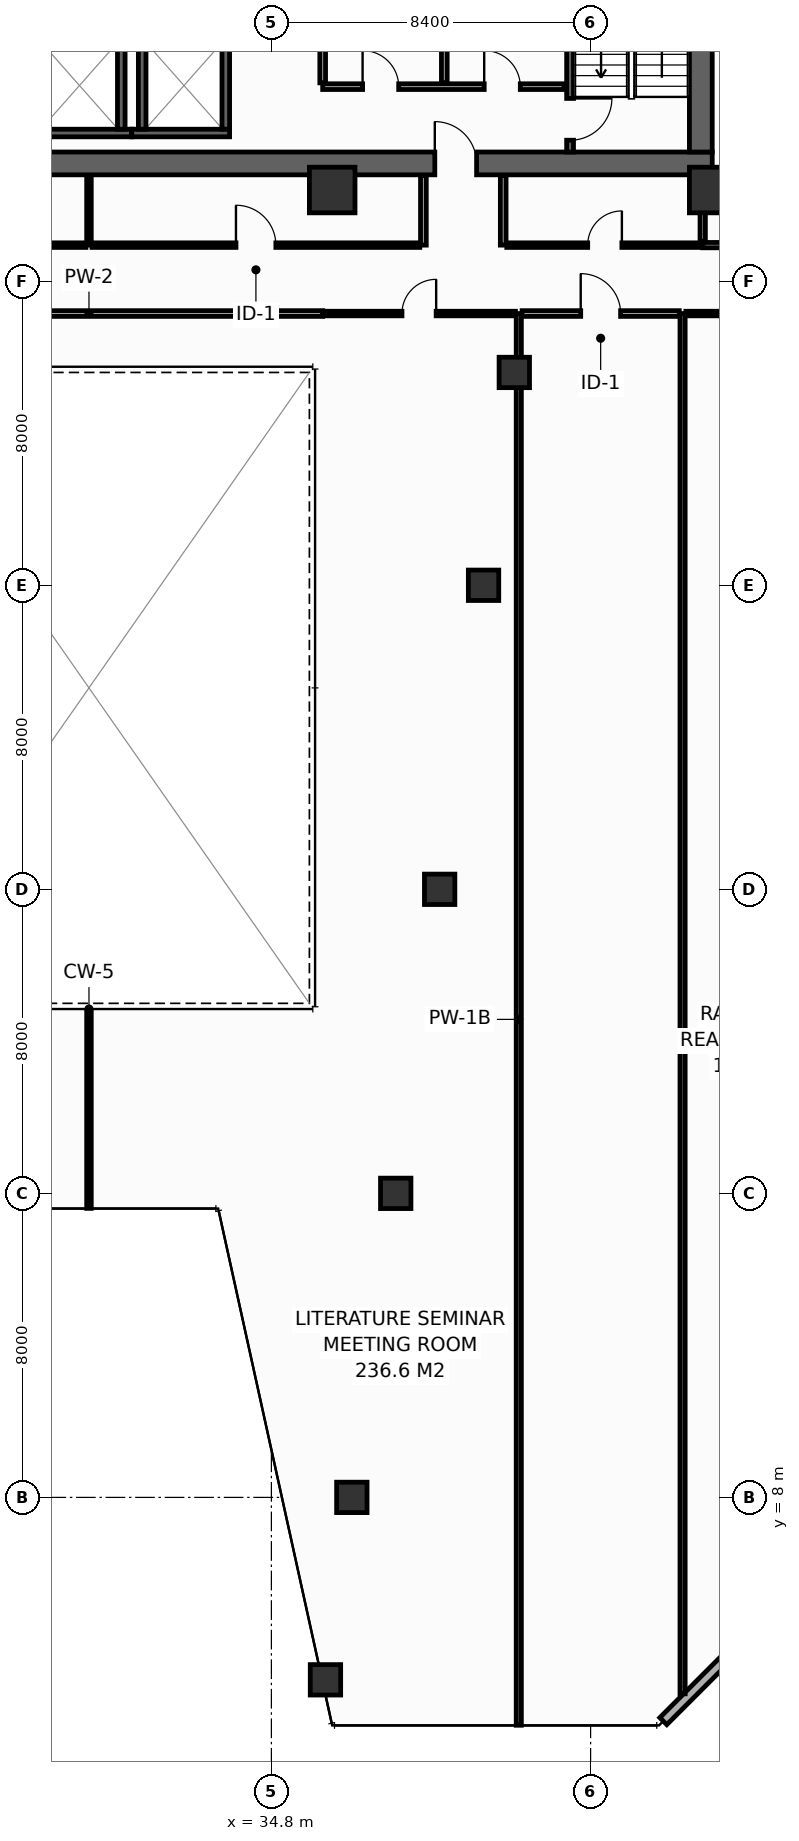
"""IFC4 building model, lengths in metres.
Left out: names, types, materials, properties, quantities, classifications, styles, units other than length and angle.
Written with IfcOpenShell. Run it as: python <this file> out.ifc"""

import sys

from ifc_helpers import new_model, si_unit, direction, frame, frame_2d, origin, origin_2d, place, context, subcontext, project, spatial, rectangle, hollow_rectangle, extrude, element, fill, save


model = new_model("IFC4")
c1 = context("Model", 3, precision=1e-05, world=origin(), true_north=direction((0.0, 1.0)))
c2 = subcontext(c1, "Body", "Model", "MODEL_VIEW")
j1 = project(units=[si_unit("LENGTHUNIT", "METRE"), si_unit("PLANEANGLEUNIT", "RADIAN")], contexts=[c1])
p1 = place(None, origin())
s1 = spatial("IfcSite", under=j1, at=p1, CompositionType="ELEMENT")
p2 = place(p1, origin())
s2 = spatial("IfcBuilding", under=s1, at=p2, CompositionType="ELEMENT")
p3 = place(p2, frame((0.0, 0.0, 97.2)))
s3 = spatial("IfcBuildingStorey", under=s2, at=p3, CompositionType="ELEMENT", Elevation=97.2)
p4 = place(p3, frame((13.5, 43.1, 0.0), z_axis=(0.0, 0.0, 1.0), x_axis=(1.0, 0.0, 0.0)))
e1 = element("IfcWall", 1, at=p4, inside=s3, PredefinedType="SHEAR", context=c2, shape_type="SweptSolid", body=[
    extrude(rectangle(XDim=32.9, YDim=0.6, at=frame_2d((16.45, 0.0))), origin(), (0.0, 0.0, 1.0), 4.15),
])
p5 = place(p4, frame((5.4, 0.0, 0.0)))
e2 = element("IfcOpeningElement", 2, at=p5, cuts=e1, PredefinedType="OPENING", context=c2, shape_type="SweptSolid", body=[
    extrude(rectangle(XDim=1.1, YDim=2.15, at=frame_2d((0.55, 1.075))), frame((0.0, 0.31, 0.0), z_axis=(0.0, -1.0, 0.0), x_axis=(1.0, 0.0, 0.0)), (0.0, 0.0, 1.0), 0.62),
])
p6 = place(p4, frame((25.6, 0.0, 0.0)))
e3 = element("IfcOpeningElement", 3, at=p6, cuts=e1, PredefinedType="OPENING", context=c2, shape_type="SweptSolid", body=[
    extrude(rectangle(XDim=1.1, YDim=2.15, at=frame_2d((0.55, 1.075))), frame((0.0, 0.31, 0.0), z_axis=(0.0, -1.0, 0.0), x_axis=(1.0, 0.0, 0.0)), (0.0, 0.0, 1.0), 0.62),
])
p7 = place(p3, frame((46.1, 43.4, 0.0), z_axis=(0.0, 0.0, 1.0), x_axis=(0.0, 1.0, 0.0)))
e4 = element("IfcWall", 4, at=p7, inside=s3, PredefinedType="SHEAR", context=c2, shape_type="SweptSolid", body=[
    extrude(rectangle(XDim=10.4, YDim=0.6, at=frame_2d((5.2, 0.0))), origin(), (0.0, 0.0, 1.0), 4.15),
])
for number, where, z_axis, x_axis in (
    (5, (36.4, 42.4, 0.0), (0.0, 0.0, 1.0), (1.0, 0.0, 0.0)),
    (6, (46.4, 42.4, 0.0), (0.0, 0.0, 1.0), (1.0, 0.0, 0.0)),
):
    element("IfcColumn", number, at=place(p3, frame(where, z_axis=z_axis, x_axis=x_axis)), inside=s3, PredefinedType="COLUMN", context=c2, shape_type="SweptSolid", body=[
        extrude(hollow_rectangle(XDim=1.2, YDim=1.2, WallThickness=0.055, at=origin_2d()), origin(), (0.0, 0.0, 1.0), 4.4),
    ])
for number, where, z_axis, x_axis in (
    (7, (36.223, 3.2, 0.0), (0.0, 0.0, 1.0), (1.0, 0.0, 0.0)),
    (8, (36.917, 8.0, 0.0), (0.0, 0.0, 1.0), (1.0, 0.0, 0.0)),
    (9, (38.072, 16.0, 0.0), (0.0, 0.0, 1.0), (1.0, 0.0, 0.0)),
    (10, (39.228, 24.0, 0.0), (0.0, 0.0, 1.0), (1.0, 0.0, 0.0)),
    (11, (40.383, 32.0, 0.0), (0.0, 0.0, 1.0), (1.0, 0.0, 0.0)),
    (12, (41.192, 37.6, 0.0), (0.0, 0.0, 1.0), (1.0, 0.0, 0.0)),
):
    element("IfcColumn", number, at=place(p3, frame(where, z_axis=z_axis, x_axis=x_axis)), inside=s3, PredefinedType="COLUMN", context=c2, shape_type="SweptSolid", body=[
        extrude(hollow_rectangle(XDim=0.8, YDim=0.8, WallThickness=0.036, at=origin_2d()), origin(), (0.0, 0.0, 1.0), 4.4),
    ])
p8 = place(p3, frame((28.375, 43.9, 0.0), z_axis=(0.0, 0.0, 1.0), x_axis=(1.0, 0.0, 0.0)))
e13 = element("IfcWall", 13, at=p8, inside=s3, PredefinedType="SHEAR", context=c2, shape_type="SweptSolid", body=[
    extrude(rectangle(XDim=2.75, YDim=0.2, at=frame_2d((1.375, 0.0))), origin(), (0.0, 0.0, 1.0), 4.15),
])
p9 = place(p3, frame((30.85, 44.0, 0.0), z_axis=(0.0, 0.0, 1.0), x_axis=(0.0, 1.0, 0.0)))
e14 = element("IfcWall", 14, at=p9, inside=s3, PredefinedType="SHEAR", context=c2, shape_type="SweptSolid", body=[
    extrude(rectangle(XDim=2.3, YDim=0.2, at=frame_2d((1.15, 0.0))), origin(), (0.0, 0.0, 1.0), 4.15),
])
p10 = place(p3, frame((31.125, 43.9, 0.0), z_axis=(0.0, 0.0, 1.0), x_axis=(1.0, 0.0, 0.0)))
e15 = element("IfcWall", 15, at=p10, inside=s3, PredefinedType="SHEAR", context=c2, shape_type="SweptSolid", body=[
    extrude(rectangle(XDim=2.575, YDim=0.2, at=frame_2d((1.288, 0.0))), origin(), (0.0, 0.0, 1.0), 4.15),
])
for number, where, z_axis, x_axis in (
    (16, (31.4, 44.0, 0.0), (0.0, 0.0, 1.0), (0.0, 1.0, 0.0)),
    (17, (33.6, 44.0, 0.0), (0.0, 0.0, 1.0), (0.0, 1.0, 0.0)),
):
    element("IfcWall", number, at=place(p3, frame(where, z_axis=z_axis, x_axis=x_axis)), inside=s3, PredefinedType="SHEAR", context=c2, shape_type="SweptSolid", body=[
        extrude(rectangle(XDim=2.3, YDim=0.2, at=frame_2d((1.15, 0.0))), origin(), (0.0, 0.0, 1.0), 4.15),
    ])
p11 = place(p3, frame((42.66, 53.8, 0.0), z_axis=(0.0, 0.0, 1.0), x_axis=(0.0, -1.0, 0.0)))
e18 = element("IfcWall", 18, at=p11, inside=s3, PredefinedType="SHEAR", context=c2, shape_type="SweptSolid", body=[
    extrude(rectangle(XDim=10.4, YDim=0.18, at=frame_2d((5.2, 0.0))), origin(), (0.0, 0.0, 1.0), 4.15),
])
p12 = place(p11, frame((8.99, 0.0, 0.0)))
e19 = element("IfcOpeningElement", 19, at=p12, cuts=e18, PredefinedType="OPENING", context=c2, shape_type="SweptSolid", body=[
    extrude(rectangle(XDim=1.1, YDim=2.15, at=frame_2d((0.55, 1.075))), frame((0.0, 0.1, 0.0), z_axis=(0.0, -1.0, 0.0), x_axis=(1.0, 0.0, 0.0)), (0.0, 0.0, 1.0), 0.2),
])
p13 = place(p3, frame((36.15, 45.12, 0.0), z_axis=(0.0, 0.0, 1.0), x_axis=(1.0, 0.0, 0.0)))
e20 = element("IfcWall", 20, at=p13, inside=s3, PredefinedType="PARTITIONING", context=c2, shape_type="SweptSolid", body=[
    extrude(rectangle(XDim=6.35, YDim=0.15, at=frame_2d((3.175, 0.0))), origin(), (0.0, 0.0, 1.0), 4.15),
])
p14 = place(p13, frame((1.05, 0.0, 0.0)))
e21 = element("IfcOpeningElement", 21, at=p14, cuts=e20, PredefinedType="OPENING", context=c2, shape_type="SweptSolid", body=[
    extrude(rectangle(XDim=0.95, YDim=2.15, at=frame_2d((0.475, 1.075))), frame((0.0, 0.085, 0.0), z_axis=(0.0, -1.0, 0.0), x_axis=(1.0, 0.0, 0.0)), (0.0, 0.0, 1.0), 0.17),
])
p15 = place(p13, frame((4.25, 0.0, 0.0)))
e22 = element("IfcOpeningElement", 22, at=p15, cuts=e20, PredefinedType="OPENING", context=c2, shape_type="SweptSolid", body=[
    extrude(rectangle(XDim=0.95, YDim=2.15, at=frame_2d((0.475, 1.075))), frame((0.0, 0.085, 0.0), z_axis=(0.0, -1.0, 0.0), x_axis=(1.0, 0.0, 0.0)), (0.0, 0.0, 1.0), 0.17),
])
for number, where, z_axis, x_axis in (
    (23, (36.15, 45.22, 0.0), (0.0, 0.0, 1.0), (0.0, 1.0, 0.0)),
    (24, (39.35, 45.22, 0.0), (0.0, 0.0, 1.0), (0.0, 1.0, 0.0)),
):
    element("IfcWall", number, at=place(p3, frame(where, z_axis=z_axis, x_axis=x_axis)), inside=s3, PredefinedType="PARTITIONING", context=c2, shape_type="SweptSolid", body=[
        extrude(rectangle(XDim=2.63, YDim=0.15, at=frame_2d((1.315, 0.0))), origin(), (0.0, 0.0, 1.0), 4.15),
    ])
p16 = place(p3, frame((45.113, 2.113, 0.0), z_axis=(0.0, 0.0, 1.0), x_axis=(0.707106781187, 0.707106781187, 0.0)))
e25 = element("IfcWall", 25, at=p16, inside=s3, PredefinedType="STANDARD", context=c2, shape_type="SweptSolid", body=[
    extrude(rectangle(XDim=4.206, YDim=0.26, at=frame_2d((2.103, 0.0))), origin(), (0.0, 0.0, 1.0), 4.15),
])
p17 = place(p3, frame((46.15, 40.95, 0.0), z_axis=(0.0, 0.0, 1.0), x_axis=(1.0, 0.0, 0.0)))
e26 = element("IfcWall", 26, at=p17, inside=s3, PredefinedType="PARTITIONING", context=c2, shape_type="SweptSolid", body=[
    extrude(rectangle(XDim=4.05, YDim=0.14, at=frame_2d((2.025, 0.0))), origin(), (0.0, 0.0, 1.0), 4.15),
])
p18 = place(p3, frame((46.15, 41.04, 0.0), z_axis=(0.0, 0.0, 1.0), x_axis=(0.0, 1.0, 0.0)))
e27 = element("IfcWall", 27, at=p18, inside=s3, PredefinedType="PARTITIONING", context=c2, shape_type="SweptSolid", body=[
    extrude(rectangle(XDim=1.74, YDim=0.14, at=frame_2d((0.87, 0.0))), origin(), (0.0, 0.0, 1.0), 4.15),
])
for number, where, z_axis, x_axis in (
    (28, (38.8, 40.95, 0.0), (0.0, 0.0, 1.0), (0.0, 1.0, 0.0)),
    (29, (40.9, 40.95, 0.0), (0.0, 0.0, 1.0), (0.0, 1.0, 0.0)),
):
    element("IfcWall", number, at=place(p3, frame(where, z_axis=z_axis, x_axis=x_axis)), inside=s3, PredefinedType="PARTITIONING", context=c2, shape_type="SweptSolid", body=[
        extrude(rectangle(XDim=1.83, YDim=0.15, at=frame_2d((0.915, 0.0))), origin(), (0.0, 0.0, 1.0), 4.15),
    ])
p19 = place(p3, frame((30.0, 40.95, 0.0), z_axis=(0.0, 0.0, 1.0), x_axis=(0.0, 1.0, 0.0)))
e30 = element("IfcWall", 30, at=p19, inside=s3, PredefinedType="PARTITIONING", context=c2, shape_type="SweptSolid", body=[
    extrude(rectangle(XDim=1.83, YDim=0.12, at=frame_2d((0.915, 0.0))), origin(), (0.0, 0.0, 1.0), 3.335),
])
p20 = place(p3, frame((20.795, 40.95, 0.0), z_axis=(0.0, 0.0, 1.0), x_axis=(1.0, 0.0, 0.0)))
e31 = element("IfcWall", 31, at=p20, inside=s3, PredefinedType="PARTITIONING", context=c2, shape_type="SweptSolid", body=[
    extrude(rectangle(XDim=9.125, YDim=0.12, at=frame_2d((4.562, 0.0))), origin(), (0.0, 0.0, 1.0), 2.735),
])
p21 = place(p20, frame((4.112, 0.0, 0.0)))
e32 = element("IfcOpeningElement", 32, at=p21, cuts=e31, PredefinedType="OPENING", context=c2, shape_type="SweptSolid", body=[
    extrude(rectangle(XDim=0.9, YDim=2.1, at=frame_2d((0.45, 1.05))), frame((0.0, 0.07, 0.0), z_axis=(0.0, -1.0, 0.0), x_axis=(1.0, 0.0, 0.0)), (0.0, 0.0, 1.0), 0.14),
])
p22 = place(p3, frame((30.08, 40.95, 0.0), z_axis=(0.0, 0.0, 1.0), x_axis=(1.0, 0.0, 0.0)))
e33 = element("IfcWall", 33, at=p22, inside=s3, PredefinedType="PARTITIONING", context=c2, shape_type="SweptSolid", body=[
    extrude(rectangle(XDim=8.625, YDim=0.12, at=frame_2d((4.312, 0.0))), origin(), (0.0, 0.0, 1.0), 2.735),
])
p23 = place(p22, frame((3.788, 0.0, 0.0)))
e34 = element("IfcOpeningElement", 34, at=p23, cuts=e33, PredefinedType="OPENING", context=c2, shape_type="SweptSolid", body=[
    extrude(rectangle(XDim=1.05, YDim=2.15, at=frame_2d((0.525, 1.075))), frame((0.0, 0.07, 0.0), z_axis=(0.0, -1.0, 0.0), x_axis=(1.0, 0.0, 0.0)), (0.0, 0.0, 1.0), 0.14),
])
p24 = place(p3, frame((40.995, 40.95, 0.0), z_axis=(0.0, 0.0, 1.0), x_axis=(1.0, 0.0, 0.0)))
e35 = element("IfcWall", 35, at=p24, inside=s3, PredefinedType="PARTITIONING", context=c2, shape_type="SweptSolid", body=[
    extrude(rectangle(XDim=5.155, YDim=0.12, at=frame_2d((2.577, 0.0))), origin(), (0.0, 0.0, 1.0), 4.15),
])
p25 = place(p24, frame((2.128, 0.0, 0.0)))
e36 = element("IfcOpeningElement", 36, at=p25, cuts=e35, PredefinedType="OPENING", context=c2, shape_type="SweptSolid", body=[
    extrude(rectangle(XDim=0.9, YDim=2.1, at=frame_2d((0.45, 1.05))), frame((0.0, 0.07, 0.0), z_axis=(0.0, -1.0, 0.0), x_axis=(1.0, 0.0, 0.0)), (0.0, 0.0, 1.0), 0.14),
])
p26 = place(p3, frame((41.31, 2.005, 0.0), z_axis=(0.0, 0.0, 1.0), x_axis=(0.0, 1.0, 0.0)))
e37 = element("IfcWall", 37, at=p26, inside=s3, PredefinedType="PARTITIONING", context=c2, shape_type="SweptSolid", body=[
    extrude(rectangle(XDim=37.145, YDim=0.135, at=frame_2d((18.573, 0.0))), origin(), (0.0, 0.0, 1.0), 2.335),
])
p27 = place(p3, frame((45.62, 2.832, 0.0), z_axis=(0.0, 0.0, 1.0), x_axis=(0.0, 1.0, 0.0)))
e38 = element("IfcWall", 38, at=p27, inside=s3, PredefinedType="PARTITIONING", context=c2, shape_type="SweptSolid", body=[
    extrude(rectangle(XDim=36.318, YDim=0.135, at=frame_2d((18.159, 0.0))), origin(), (0.0, 0.0, 1.0), 2.335),
])
p28 = place(p3, frame((30.0, 15.605, 0.0), z_axis=(0.0, 0.0, 1.0), x_axis=(0.0, 1.0, 0.0)))
e39 = element("IfcWall", 39, at=p28, inside=s3, PredefinedType="PARTITIONING", context=c2, shape_type="SweptSolid", body=[
    extrude(rectangle(XDim=5.175, YDim=0.12, at=frame_2d((2.587, 0.0))), origin(), (0.0, 0.0, 1.0), 4.15),
])
p29 = place(p3, frame((23.85, 39.15, 0.0), z_axis=(0.0, 0.0, 1.0), x_axis=(1.0, 0.0, 0.0)))
e40 = element("IfcWall", 40, at=p29, inside=s3, PredefinedType="PARTITIONING", context=c2, shape_type="SweptSolid", body=[
    extrude(rectangle(XDim=12.3, YDim=0.15, at=frame_2d((6.15, 0.0))), origin(), (0.0, 0.0, 1.0), 4.15),
])
p30 = place(p3, frame((36.15, 39.15, 0.0), z_axis=(0.0, 0.0, 1.0), x_axis=(1.0, 0.0, 0.0)))
e41 = element("IfcWall", 41, at=p30, inside=s3, PredefinedType="PARTITIONING", context=c2, shape_type="SweptSolid", body=[
    extrude(rectangle(XDim=5.073, YDim=0.12, at=frame_2d((2.536, 0.0))), origin(), (0.0, 0.0, 1.0), 2.735),
])
p31 = place(p30, frame((2.086, 0.0, 0.0)))
e42 = element("IfcOpeningElement", 42, at=p31, cuts=e41, PredefinedType="OPENING", context=c2, shape_type="SweptSolid", body=[
    extrude(rectangle(XDim=0.9, YDim=2.1, at=frame_2d((0.45, 1.05))), frame((0.0, 0.07, 0.0), z_axis=(0.0, -1.0, 0.0), x_axis=(1.0, 0.0, 0.0)), (0.0, 0.0, 1.0), 0.14),
])
p32 = place(p3, frame((41.397, 39.15, 0.0), z_axis=(0.0, 0.0, 1.0), x_axis=(1.0, 0.0, 0.0)))
e43 = element("IfcWall", 43, at=p32, inside=s3, PredefinedType="PARTITIONING", context=c2, shape_type="SweptSolid", body=[
    extrude(rectangle(XDim=4.135, YDim=0.15, at=frame_2d((2.067, 0.0))), origin(), (0.0, 0.0, 1.0), 4.15),
])
p33 = place(p32, frame((1.542, 0.0, 0.0)))
e44 = element("IfcOpeningElement", 44, at=p33, cuts=e43, PredefinedType="OPENING", context=c2, shape_type="SweptSolid", body=[
    extrude(rectangle(XDim=1.05, YDim=2.15, at=frame_2d((0.525, 1.075))), frame((0.0, 0.085, 0.0), z_axis=(0.0, -1.0, 0.0), x_axis=(1.0, 0.0, 0.0)), (0.0, 0.0, 1.0), 0.17),
])
p34 = place(p3, frame((45.708, 39.15, 0.0), z_axis=(0.0, 0.0, 1.0), x_axis=(1.0, 0.0, 0.0)))
e45 = element("IfcWall", 45, at=p34, inside=s3, PredefinedType="PARTITIONING", context=c2, shape_type="SweptSolid", body=[
    extrude(rectangle(XDim=3.785, YDim=0.12, at=frame_2d((1.893, 0.0))), origin(), (0.0, 0.0, 1.0), 4.15),
])
p35 = place(p34, frame((1.367, 0.0, 0.0)))
e46 = element("IfcOpeningElement", 46, at=p35, cuts=e45, PredefinedType="OPENING", context=c2, shape_type="SweptSolid", body=[
    extrude(rectangle(XDim=1.05, YDim=2.15, at=frame_2d((0.525, 1.075))), frame((0.0, 0.07, 0.0), z_axis=(0.0, -1.0, 0.0), x_axis=(1.0, 0.0, 0.0)), (0.0, 0.0, 1.0), 0.14),
])
p36 = place(p12, origin())
e47 = element("IfcDoor", 47, at=p36, inside=s3, OperationType="SINGLE_SWING_LEFT", PredefinedType="DOOR", context=c2, shape_type="SweptSolid", body=[
    extrude(rectangle(XDim=1.1, YDim=2.15, at=frame_2d((0.55, 1.075))), frame((0.0, 0.025, 0.0), z_axis=(0.0, -1.0, 0.0), x_axis=(1.0, 0.0, 0.0)), (0.0, 0.0, 1.0), 0.05),
])
fill(e19, e47)
p37 = place(p6, origin())
e48 = element("IfcDoor", 48, at=p37, inside=s3, OperationType="SINGLE_SWING_LEFT", PredefinedType="DOOR", context=c2, shape_type="SweptSolid", body=[
    extrude(rectangle(XDim=1.1, YDim=2.15, at=frame_2d((0.55, 1.075))), frame((0.0, 0.025, 0.0), z_axis=(0.0, -1.0, 0.0), x_axis=(1.0, 0.0, 0.0)), (0.0, 0.0, 1.0), 0.05),
])
fill(e3, e48)
p38 = place(p14, origin())
e49 = element("IfcDoor", 49, at=p38, inside=s3, OperationType="SINGLE_SWING_LEFT", PredefinedType="DOOR", context=c2, shape_type="SweptSolid", body=[
    extrude(rectangle(XDim=0.95, YDim=2.15, at=frame_2d((0.475, 1.075))), frame((0.0, 0.025, 0.0), z_axis=(0.0, -1.0, 0.0), x_axis=(1.0, 0.0, 0.0)), (0.0, 0.0, 1.0), 0.05),
])
fill(e21, e49)
p39 = place(p15, origin())
e50 = element("IfcDoor", 50, at=p39, inside=s3, OperationType="SINGLE_SWING_LEFT", PredefinedType="DOOR", context=c2, shape_type="SweptSolid", body=[
    extrude(rectangle(XDim=0.95, YDim=2.15, at=frame_2d((0.475, 1.075))), frame((0.0, 0.025, 0.0), z_axis=(0.0, -1.0, 0.0), x_axis=(1.0, 0.0, 0.0)), (0.0, 0.0, 1.0), 0.05),
])
fill(e22, e50)
p40 = place(p23, origin())
e51 = element("IfcDoor", 51, at=p40, inside=s3, OperationType="SINGLE_SWING_LEFT", PredefinedType="DOOR", context=c2, shape_type="SweptSolid", body=[
    extrude(rectangle(XDim=1.05, YDim=2.15, at=frame_2d((0.525, 1.075))), frame((0.0, 0.025, 0.0), z_axis=(0.0, -1.0, 0.0), x_axis=(1.0, 0.0, 0.0)), (0.0, 0.0, 1.0), 0.05),
])
fill(e34, e51)
p41 = place(p25, origin())
e52 = element("IfcDoor", 52, at=p41, inside=s3, OperationType="SINGLE_SWING_RIGHT", PredefinedType="DOOR", context=c2, shape_type="SweptSolid", body=[
    extrude(rectangle(XDim=0.9, YDim=2.1, at=frame_2d((0.45, 1.05))), frame((0.0, 0.025, 0.0), z_axis=(0.0, -1.0, 0.0), x_axis=(1.0, 0.0, 0.0)), (0.0, 0.0, 1.0), 0.05),
])
fill(e36, e52)
p42 = place(p31, origin())
e53 = element("IfcDoor", 53, at=p42, inside=s3, OperationType="SINGLE_SWING_RIGHT", PredefinedType="DOOR", context=c2, shape_type="SweptSolid", body=[
    extrude(rectangle(XDim=0.9, YDim=2.1, at=frame_2d((0.45, 1.05))), frame((0.0, 0.025, 0.0), z_axis=(0.0, -1.0, 0.0), x_axis=(1.0, 0.0, 0.0)), (0.0, 0.0, 1.0), 0.05),
])
fill(e42, e53)
p43 = place(p33, origin())
e54 = element("IfcDoor", 54, at=p43, inside=s3, OperationType="SINGLE_SWING_LEFT", PredefinedType="DOOR", context=c2, shape_type="SweptSolid", body=[
    extrude(rectangle(XDim=1.05, YDim=2.15, at=frame_2d((0.525, 1.075))), frame((0.0, 0.025, 0.0), z_axis=(0.0, -1.0, 0.0), x_axis=(1.0, 0.0, 0.0)), (0.0, 0.0, 1.0), 0.05),
])
fill(e44, e54)
save(model, sys.argv[1])
